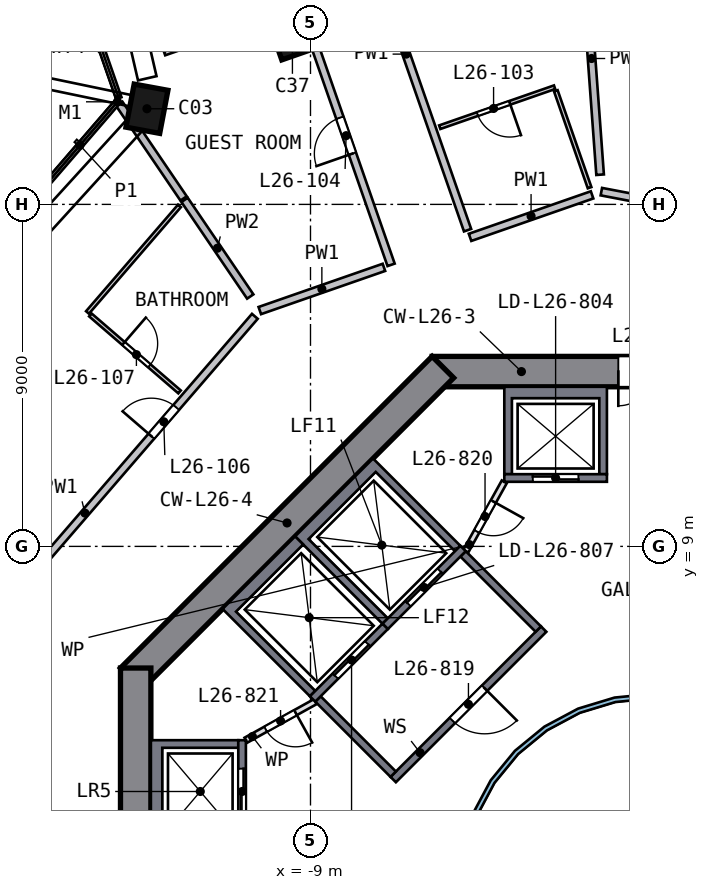
"""IFC4 building model, lengths in metres.
Left out: names, types, materials, properties, quantities, classifications, styles, units other than length and angle.
Written with IfcOpenShell. Run it as: python <this file> out.ifc"""

import sys

from ifc_helpers import new_model, si_unit, direction, frame, frame_2d, origin, origin_2d, place, context, subcontext, project, spatial, polyline, rectangle, outline, extrude, element, fill, save


model = new_model("IFC4")
c1 = context("Model", 3, precision=1e-05, world=origin(), true_north=direction((0.0, 1.0)))
c2 = subcontext(c1, "Body", "Model", "MODEL_VIEW")
j1 = project(units=[si_unit("LENGTHUNIT", "METRE"), si_unit("PLANEANGLEUNIT", "RADIAN")], contexts=[c1])
p1 = place(None, origin())
s1 = spatial("IfcSite", under=j1, at=p1, CompositionType="ELEMENT")
p2 = place(p1, origin())
s2 = spatial("IfcBuilding", under=s1, at=p2, CompositionType="ELEMENT")
p3 = place(p2, frame((0.0, 0.0, 111.5)))
s3 = spatial("IfcBuildingStorey", under=s2, at=p3, CompositionType="ELEMENT", Elevation=111.5)
p4 = place(p3, frame((-13.186, 20.594, 0.0), z_axis=(-0.097375682, -0.063548845, 0.993216754), x_axis=(0.179806408, 0.98041432, 0.080358058)))
e1 = element("IfcColumn", 1, at=p4, inside=s3, PredefinedType="COLUMN", context=c2, shape_type="SweptSolid", body=[
    extrude(rectangle(XDim=1.15, YDim=0.9, at=origin_2d()), origin(), (0.0, 0.0, 1.0), 3.212),
])
p5 = place(p3, frame((-9.347, 22.432, 0.0), z_axis=(-0.106278765, -0.045309116, 0.993303533), x_axis=(-0.329531478, 0.944112311, 0.007806975)))
e2 = element("IfcColumn", 2, at=p5, inside=s3, PredefinedType="COLUMN", context=c2, shape_type="SweptSolid", body=[
    extrude(rectangle(XDim=0.9, YDim=0.9, at=origin_2d()), origin(), (0.0, 0.0, 1.0), 3.211),
])
p6 = place(p3, frame((5.799, 13.6, 0.0), z_axis=(0.0, 0.0, 1.0), x_axis=(-1.0, 0.0, 0.0)))
e3 = element("IfcWall", 3, at=p6, inside=s3, PredefinedType="SHEAR", context=c2, shape_type="SweptSolid", body=[
    extrude(rectangle(XDim=11.598, YDim=0.8, at=frame_2d((5.799, 0.0))), origin(), (0.0, 0.0, 1.0), 3.5),
])
p7 = place(p6, frame((4.899, 0.0, 0.0)))
e4 = element("IfcOpeningElement", 4, at=p7, cuts=e3, PredefinedType="OPENING", context=c2, shape_type="SweptSolid", body=[
    extrude(rectangle(XDim=1.8, YDim=2.1, at=frame_2d((0.9, 1.05))), frame((0.0, 0.41, 0.0), z_axis=(0.0, -1.0, 0.0), x_axis=(1.0, 0.0, 0.0)), (0.0, 0.0, 1.0), 0.82),
])
p8 = place(p3, frame((-5.516, 13.717, 0.0), z_axis=(0.0, 0.0, 1.0), x_axis=(-0.707106781, -0.707106781, 0.0)))
e5 = element("IfcWall", 5, at=p8, inside=s3, PredefinedType="SHEAR", context=c2, shape_type="SweptSolid", body=[
    extrude(rectangle(XDim=11.598, YDim=0.8, at=frame_2d((5.799, 0.0))), origin(), (0.0, 0.0, 1.0), 3.5),
])
p9 = place(p3, frame((-13.6, 5.799, 0.0), z_axis=(0.0, 0.0, 1.0), x_axis=(0.0, -1.0, 0.0)))
e6 = element("IfcWall", 6, at=p9, inside=s3, PredefinedType="SHEAR", context=c2, shape_type="SweptSolid", body=[
    extrude(rectangle(XDim=11.598, YDim=0.8, at=frame_2d((5.799, 0.0))), origin(), (0.0, 0.0, 1.0), 3.5),
])
p10 = place(p9, frame((4.899, 0.0, 0.0)))
e7 = element("IfcOpeningElement", 7, at=p10, cuts=e6, PredefinedType="OPENING", context=c2, shape_type="SweptSolid", body=[
    extrude(rectangle(XDim=1.8, YDim=2.1, at=frame_2d((0.9, 1.05))), frame((0.0, 0.41, 0.0), z_axis=(0.0, -1.0, 0.0), x_axis=(1.0, 0.0, 0.0)), (0.0, 0.0, 1.0), 0.82),
])
p11 = place(p3, origin())
e8 = element("IfcWall", 8, at=p11, inside=s3, PredefinedType="SOLIDWALL", context=c2, shape_type="SweptSolid", body=[
    extrude(outline(polyline([(-3.9, 10.9), (-3.9, 13.2), (-1.2, 13.2), (-1.2, 10.9), (-1.4, 10.9), (-1.4, 12.9), (-3.7, 12.9), (-3.7, 10.9), (-3.9, 10.9)])), origin(), (0.0, 0.0, 1.0), 3.19),
])
p12 = place(p3, frame((-1.2, 10.8, 0.0), z_axis=(0.0, 0.0, 1.0), x_axis=(-1.0, 0.0, 0.0)))
e9 = element("IfcWall", 9, at=p12, inside=s3, PredefinedType="SOLIDWALL", context=c2, shape_type="SweptSolid", body=[
    extrude(rectangle(XDim=2.7, YDim=0.2, at=frame_2d((1.35, 0.0))), origin(), (0.0, 0.0, 1.0), 3.19),
])
p13 = place(p12, frame((0.75, 0.0, 0.0)))
e10 = element("IfcOpeningElement", 10, at=p13, cuts=e9, PredefinedType="OPENING", context=c2, shape_type="SweptSolid", body=[
    extrude(rectangle(XDim=1.2, YDim=2.1, at=frame_2d((0.6, 1.05))), frame((0.0, 0.11, 0.0), z_axis=(0.0, -1.0, 0.0), x_axis=(1.0, 0.0, 0.0)), (0.0, 0.0, 1.0), 0.22),
])
p14 = place(p3, origin())
e11 = element("IfcWall", 11, at=p14, inside=s3, PredefinedType="SOLIDWALL", context=c2, shape_type="SweptSolid", body=[
    extrude(outline(polyline([(-13.2, 3.9), (-10.9, 3.9), (-10.9, 3.7), (-12.9, 3.7), (-12.9, 1.4), (-10.9, 1.4), (-10.9, 1.2), (-13.2, 1.2), (-13.2, 3.9)])), origin(), (0.0, 0.0, 1.0), 3.19),
])
p15 = place(p3, frame((-10.8, 1.2, 0.0), z_axis=(0.0, 0.0, 1.0), x_axis=(0.0, 1.0, 0.0)))
e12 = element("IfcWall", 12, at=p15, inside=s3, PredefinedType="SOLIDWALL", context=c2, shape_type="SweptSolid", body=[
    extrude(rectangle(XDim=2.7, YDim=0.2, at=frame_2d((1.35, 0.0))), origin(), (0.0, 0.0, 1.0), 3.19),
])
p16 = place(p15, frame((0.75, 0.0, 0.0)))
e13 = element("IfcOpeningElement", 13, at=p16, cuts=e12, PredefinedType="OPENING", context=c2, shape_type="SweptSolid", body=[
    extrude(rectangle(XDim=1.2, YDim=2.1, at=frame_2d((0.6, 1.05))), frame((0.0, 0.11, 0.0), z_axis=(0.0, -1.0, 0.0), x_axis=(1.0, 0.0, 0.0)), (0.0, 0.0, 1.0), 0.22),
])
p17 = place(p3, origin())
e14 = element("IfcWall", 14, at=p17, inside=s3, PredefinedType="SOLIDWALL", context=c2, shape_type="SweptSolid", body=[
    extrude(outline(polyline([(-9.405, 9.263), (-7.354, 11.314), (-5.056, 9.016), (-5.197, 8.874), (-7.283, 10.96), (-9.051, 9.192), (-6.965, 7.106), (-7.106, 6.965), (-9.405, 9.263)])), origin(), (0.0, 0.0, 1.0), 3.19),
])
p18 = place(p3, frame((-4.985, 8.945, 0.0), z_axis=(0.0, 0.0, 1.0), x_axis=(-0.707106781, -0.707106781, 0.0)))
e15 = element("IfcWall", 15, at=p18, inside=s3, PredefinedType="SOLIDWALL", context=c2, shape_type="SweptSolid", body=[
    extrude(rectangle(XDim=2.9, YDim=0.2, at=frame_2d((1.45, 0.0))), origin(), (0.0, 0.0, 1.0), 3.19),
])
p19 = place(p18, frame((0.85, 0.0, 0.0)))
e16 = element("IfcOpeningElement", 16, at=p19, cuts=e15, PredefinedType="OPENING", context=c2, shape_type="SweptSolid", body=[
    extrude(rectangle(XDim=1.2, YDim=2.1, at=frame_2d((0.6, 1.05))), frame((0.0, 0.11, 0.0), z_axis=(0.0, -1.0, 0.0), x_axis=(1.0, 0.0, 0.0)), (0.0, 0.0, 1.0), 0.22),
])
p20 = place(p3, origin())
e17 = element("IfcWall", 17, at=p20, inside=s3, PredefinedType="SOLIDWALL", context=c2, shape_type="SweptSolid", body=[
    extrude(outline(polyline([(-11.314, 7.354), (-9.405, 9.263), (-9.192, 9.051), (-10.96, 7.283), (-8.874, 5.197), (-9.016, 5.056), (-11.314, 7.354)])), origin(), (0.0, 0.0, 1.0), 3.19),
])
p21 = place(p3, frame((-7.036, 6.894, 0.0), z_axis=(0.0, 0.0, 1.0), x_axis=(-0.707106781, -0.707106781, 0.0)))
e18 = element("IfcWall", 18, at=p21, inside=s3, PredefinedType="SOLIDWALL", context=c2, shape_type="SweptSolid", body=[
    extrude(rectangle(XDim=2.7, YDim=0.2, at=frame_2d((1.35, 0.0))), origin(), (0.0, 0.0, 1.0), 3.19),
])
p22 = place(p21, frame((0.65, 0.0, 0.0)))
e19 = element("IfcOpeningElement", 19, at=p22, cuts=e18, PredefinedType="OPENING", context=c2, shape_type="SweptSolid", body=[
    extrude(rectangle(XDim=1.2, YDim=2.1, at=frame_2d((0.6, 1.05))), frame((0.0, 0.11, 0.0), z_axis=(0.0, -1.0, 0.0), x_axis=(1.0, 0.0, 0.0)), (0.0, 0.0, 1.0), 0.22),
])
p23 = place(p3, frame((-2.864, 6.823, 0.0), z_axis=(0.0, 0.0, 1.0), x_axis=(-0.707106781, -0.707106781, 0.0)))
e20 = element("IfcWall", 20, at=p23, inside=s3, PredefinedType="SOLIDWALL", context=c2, shape_type="SweptSolid", body=[
    extrude(rectangle(XDim=5.6, YDim=0.2, at=frame_2d((2.8, 0.0))), origin(), (0.0, 0.0, 1.0), 3.19),
])
p24 = place(p23, frame((2.2, 0.0, 0.0)))
e21 = element("IfcOpeningElement", 21, at=p24, cuts=e20, PredefinedType="OPENING", context=c2, shape_type="SweptSolid", body=[
    extrude(rectangle(XDim=1.2, YDim=2.1, at=frame_2d((0.6, 1.05))), frame((0.0, 0.11, 0.0), z_axis=(0.0, -1.0, 0.0), x_axis=(1.0, 0.0, 0.0)), (0.0, 0.0, 1.0), 0.22),
])
for number, where, z_axis, x_axis in (
    (22, (-3.005, 6.823, 0.0), (0.0, 0.0, 1.0), (-0.707, 0.707, 0.0)),
    (23, (-6.823, 3.005, 0.0), (0.0, 0.0, 1.0), (-0.707, 0.707, 0.0)),
):
    element("IfcWall", number, at=place(p3, frame(where, z_axis=z_axis, x_axis=x_axis)), inside=s3, PredefinedType="SOLIDWALL", context=c2, shape_type="SweptSolid", body=[
        extrude(rectangle(XDim=2.8, YDim=0.2, at=frame_2d((1.4, 0.0))), origin(), (0.0, 0.0, 1.0), 3.19),
    ])
p25 = place(p3, frame((-3.9, 10.7, 0.0), z_axis=(0.0, 0.0, 1.0), x_axis=(-0.485692555, -0.874129705, 0.0)))
e24 = element("IfcWall", 24, at=p25, inside=s3, PredefinedType="PARTITIONING", context=c2, shape_type="SweptSolid", body=[
    extrude(rectangle(XDim=2.089, YDim=0.15, at=frame_2d((1.044, 0.0))), origin(), (0.0, 0.0, 1.0), 3.19),
])
p26 = place(p25, frame((0.594, 0.0, 0.0)))
e25 = element("IfcOpeningElement", 25, at=p26, cuts=e24, PredefinedType="OPENING", context=c2, shape_type="SweptSolid", body=[
    extrude(rectangle(XDim=0.9, YDim=2.1, at=frame_2d((0.45, 1.05))), frame((0.0, 0.085, 0.0), z_axis=(0.0, -1.0, 0.0), x_axis=(1.0, 0.0, 0.0)), (0.0, 0.0, 1.0), 0.17),
])
p27 = place(p3, frame((-8.874, 4.914, 0.0), z_axis=(0.0, 0.0, 1.0), x_axis=(-0.874129705, -0.485692555, 0.0)))
e26 = element("IfcWall", 26, at=p27, inside=s3, PredefinedType="PARTITIONING", context=c2, shape_type="SweptSolid", body=[
    extrude(rectangle(XDim=2.089, YDim=0.15, at=frame_2d((1.044, 0.0))), origin(), (0.0, 0.0, 1.0), 3.19),
])
p28 = place(p27, frame((0.594, 0.0, 0.0)))
e27 = element("IfcOpeningElement", 27, at=p28, cuts=e26, PredefinedType="OPENING", context=c2, shape_type="SweptSolid", body=[
    extrude(rectangle(XDim=0.9, YDim=2.1, at=frame_2d((0.45, 1.05))), frame((0.0, 0.085, 0.0), z_axis=(0.0, -1.0, 0.0), x_axis=(1.0, 0.0, 0.0)), (0.0, 0.0, 1.0), 0.17),
])
p29 = place(p3, origin())
e28 = element("IfcWall", 28, at=p29, inside=s3, PredefinedType="SOLIDWALL", context=c2, shape_type="SweptSolid", body=[
    extrude(outline(polyline([(5.021, -0.999), (4.73, -1.959), (4.257, -2.844), (3.62, -3.62), (2.844, -4.257), (1.959, -4.73), (0.999, -5.021), (0.0, -5.12), (-0.999, -5.021), (-1.959, -4.73), (-2.844, -4.257), (-3.62, -3.62), (-4.257, -2.844), (-4.73, -1.959), (-5.021, -0.999), (-5.12, 0.0), (-5.021, 0.999), (-4.73, 1.959), (-4.257, 2.844), (-3.62, 3.62), (-2.844, 4.257), (-1.959, 4.73), (-0.999, 5.021), (0.0, 5.12), (0.999, 5.021), (1.959, 4.73), (2.844, 4.257), (3.62, 3.62), (4.257, 2.844), (4.73, 1.959), (5.021, 0.999), (5.12, 0.0), (5.021, -0.999)]), holes=[polyline([(4.904, 0.976), (4.619, 1.913), (4.157, 2.778), (3.535, 3.535), (2.778, 4.157), (1.913, 4.619), (0.976, 4.904), (0.0, 5.0), (-0.976, 4.904), (-1.913, 4.619), (-2.778, 4.157), (-3.535, 3.535), (-4.157, 2.778), (-4.619, 1.913), (-4.904, 0.976), (-5.0, 0.0), (-4.904, -0.976), (-4.619, -1.913), (-4.157, -2.778), (-3.535, -3.535), (-2.778, -4.157), (-1.913, -4.619), (-0.976, -4.904), (0.0, -5.0), (0.976, -4.904), (1.913, -4.619), (2.778, -4.157), (3.535, -3.535), (4.157, -2.778), (4.619, -1.913), (4.904, -0.976), (5.0, 0.0), (4.904, 0.976)])]), origin(), (0.0, 0.0, 1.0), 3.19),
])
p30 = place(p3, frame((-16.552, 8.002, 0.0), z_axis=(0.0, 0.0, 1.0), x_axis=(0.653409696, 0.757004471, 0.0)))
e29 = element("IfcWall", 29, at=p30, inside=s3, PredefinedType="SOLIDWALL", context=c2, shape_type="SweptSolid", body=[
    extrude(rectangle(XDim=9.316, YDim=0.2, at=frame_2d((4.658, 0.0))), origin(), (0.0, 0.0, 1.0), 3.19),
])
p31 = place(p30, frame((5.15, 0.0, 0.0)))
e30 = element("IfcOpeningElement", 30, at=p31, cuts=e29, PredefinedType="OPENING", context=c2, shape_type="SweptSolid", body=[
    extrude(rectangle(XDim=1.0, YDim=2.1, at=frame_2d((0.5, 1.05))), frame((0.0, 0.11, 0.0), z_axis=(0.0, -1.0, 0.0), x_axis=(1.0, 0.0, 0.0)), (0.0, 0.0, 1.0), 0.22),
])
p32 = place(p3, frame((-7.068, 16.343, 0.0), z_axis=(0.0, 0.0, 1.0), x_axis=(-0.944384357, -0.328843712, 0.0)))
e31 = element("IfcWall", 31, at=p32, inside=s3, PredefinedType="SOLIDWALL", context=c2, shape_type="SweptSolid", body=[
    extrude(rectangle(XDim=3.458, YDim=0.2, at=frame_2d((1.729, 0.0))), origin(), (0.0, 0.0, 1.0), 3.19),
])
p33 = place(p3, frame((-6.879, 16.409, 0.0), z_axis=(0.0, 0.0, 1.0), x_axis=(-0.328868616, 0.944375684, 0.0)))
e32 = element("IfcWall", 32, at=p33, inside=s3, PredefinedType="SOLIDWALL", context=c2, shape_type="SweptSolid", body=[
    extrude(rectangle(XDim=10.013, YDim=0.2, at=frame_2d((5.006, 0.0))), origin(), (0.0, 0.0, 1.0), 3.19),
])
p34 = place(p33, frame((3.1, 0.0, 0.0)))
e33 = element("IfcOpeningElement", 33, at=p34, cuts=e32, PredefinedType="OPENING", context=c2, shape_type="SweptSolid", body=[
    extrude(rectangle(XDim=1.0, YDim=2.1, at=frame_2d((0.5, 1.05))), frame((0.0, 0.11, 0.0), z_axis=(0.0, -1.0, 0.0), x_axis=(1.0, 0.0, 0.0)), (0.0, 0.0, 1.0), 0.22),
])
p35 = place(p3, frame((-4.867, 17.321, 0.0), z_axis=(0.0, 0.0, 1.0), x_axis=(-0.328858345, 0.944379261, 0.0)))
e34 = element("IfcWall", 34, at=p35, inside=s3, PredefinedType="SOLIDWALL", context=c2, shape_type="SweptSolid", body=[
    extrude(rectangle(XDim=9.813, YDim=0.2, at=frame_2d((4.906, 0.0))), origin(), (0.0, 0.0, 1.0), 3.19),
])
p36 = place(p3, frame((-1.59, 18.25, 0.0), z_axis=(0.0, 0.0, 1.0), x_axis=(-0.944376615, -0.328865944, 0.0)))
e35 = element("IfcWall", 35, at=p36, inside=s3, PredefinedType="SOLIDWALL", context=c2, shape_type="SweptSolid", body=[
    extrude(rectangle(XDim=3.4, YDim=0.2, at=frame_2d((1.7, 0.0))), origin(), (0.0, 0.0, 1.0), 3.19),
])
p37 = place(p3, frame((8.001, 16.552, 0.0), z_axis=(0.0, 0.0, 1.0), x_axis=(-0.982286432, 0.187385606, 0.0)))
e36 = element("IfcWall", 36, at=p37, inside=s3, PredefinedType="SOLIDWALL", context=c2, shape_type="SweptSolid", body=[
    extrude(rectangle(XDim=9.516, YDim=0.2, at=frame_2d((4.758, 0.0))), origin(), (0.0, 0.0, 1.0), 3.19),
])
p38 = place(p3, frame((-12.339, 18.156, 0.0), z_axis=(0.0, 0.0, 1.0), x_axis=(-0.562123746, 0.827053138, 0.0)))
e37 = element("IfcWall", 37, at=p38, inside=s3, PredefinedType="SOLIDWALL", context=c2, shape_type="SweptSolid", body=[
    extrude(rectangle(XDim=3.011, YDim=0.2, at=frame_2d((1.506, 0.0))), origin(), (0.0, 0.0, 1.0), 3.19),
])
p39 = place(p3, frame((-10.585, 15.576, 0.0), z_axis=(0.0, 0.0, 1.0), x_axis=(-0.562099331, 0.827069732, 0.0)))
e38 = element("IfcWall", 38, at=p39, inside=s3, PredefinedType="SOLIDWALL", context=c2, shape_type="SweptSolid", body=[
    extrude(rectangle(XDim=3.075, YDim=0.2, at=frame_2d((1.537, 0.0))), origin(), (0.0, 0.0, 1.0), 3.19),
])
p40 = place(p3, frame((-1.828, 24.897, 0.0), z_axis=(0.0, 0.0, 1.0), x_axis=(0.073258648, -0.997312975, 0.0)))
e39 = element("IfcWall", 39, at=p40, inside=s3, PredefinedType="SOLIDWALL", context=c2, shape_type="SweptSolid", body=[
    extrude(rectangle(XDim=6.132, YDim=0.2, at=frame_2d((3.066, 0.0))), origin(), (0.0, 0.0, 1.0), 3.19),
])
p41 = place(p3, frame((-14.868, 15.156, 0.0), z_axis=(0.0, 0.0, 1.0), x_axis=(0.653436238, 0.756981561, 0.0)))
e40 = element("IfcWall", 40, at=p41, inside=s3, PredefinedType="PARTITIONING", context=c2, shape_type="SweptSolid", body=[
    extrude(rectangle(XDim=3.704, YDim=0.1, at=frame_2d((1.852, 0.0))), origin(), (0.0, 0.0, 1.0), 3.19),
])
p42 = place(p3, frame((-14.792, 15.091, 0.0), z_axis=(0.0, 0.0, 1.0), x_axis=(0.75698944, -0.65342711, 0.0)))
e41 = element("IfcWall", 41, at=p42, inside=s3, PredefinedType="PARTITIONING", context=c2, shape_type="SweptSolid", body=[
    extrude(rectangle(XDim=3.1, YDim=0.1, at=frame_2d((1.55, 0.0))), origin(), (0.0, 0.0, 1.0), 3.19),
])
p43 = place(p42, frame((1.15, 0.0, 0.0)))
e42 = element("IfcOpeningElement", 42, at=p43, cuts=e41, PredefinedType="OPENING", context=c2, shape_type="SweptSolid", body=[
    extrude(rectangle(XDim=0.9, YDim=2.1, at=frame_2d((0.45, 1.05))), frame((0.0, 0.06, 0.0), z_axis=(0.0, -1.0, 0.0), x_axis=(1.0, 0.0, 0.0)), (0.0, 0.0, 1.0), 0.12),
])
p44 = place(p3, frame((-12.84, 21.971, 0.0), z_axis=(0.0, 0.0, 1.0), x_axis=(0.944359478, 0.32891515, 0.0)))
e43 = element("IfcWall", 43, at=p44, inside=s3, PredefinedType="PARTITIONING", context=c2, shape_type="SweptSolid", body=[
    extrude(rectangle(XDim=3.6, YDim=0.1, at=frame_2d((1.8, 0.0))), origin(), (0.0, 0.0, 1.0), 3.19),
])
p45 = place(p44, frame((1.4, 0.0, 0.0)))
e44 = element("IfcOpeningElement", 44, at=p45, cuts=e43, PredefinedType="OPENING", context=c2, shape_type="SweptSolid", body=[
    extrude(rectangle(XDim=1.0, YDim=2.1, at=frame_2d((0.5, 1.05))), frame((0.0, 0.06, 0.0), z_axis=(0.0, -1.0, 0.0), x_axis=(1.0, 0.0, 0.0)), (0.0, 0.0, 1.0), 0.12),
])
p46 = place(p3, frame((-2.577, 21.083, 0.0), z_axis=(0.0, 0.0, 1.0), x_axis=(-0.94439589, -0.328810589, 0.0)))
e45 = element("IfcWall", 45, at=p46, inside=s3, PredefinedType="PARTITIONING", context=c2, shape_type="SweptSolid", body=[
    extrude(rectangle(XDim=3.2, YDim=0.1, at=frame_2d((1.6, 0.0))), origin(), (0.0, 0.0, 1.0), 3.19),
])
p47 = place(p46, frame((1.25, 0.0, 0.0)))
e46 = element("IfcOpeningElement", 46, at=p47, cuts=e45, PredefinedType="OPENING", context=c2, shape_type="SweptSolid", body=[
    extrude(rectangle(XDim=0.9, YDim=2.1, at=frame_2d((0.45, 1.05))), frame((0.0, 0.06, 0.0), z_axis=(0.0, -1.0, 0.0), x_axis=(1.0, 0.0, 0.0)), (0.0, 0.0, 1.0), 0.12),
])
p48 = place(p3, frame((-1.656, 18.439, 0.0), z_axis=(0.0, 0.0, 1.0), x_axis=(-0.328867808, 0.944375966, 0.0)))
e47 = element("IfcWall", 47, at=p48, inside=s3, PredefinedType="PARTITIONING", context=c2, shape_type="SweptSolid", body=[
    extrude(rectangle(XDim=2.7, YDim=0.1, at=frame_2d((1.35, 0.0))), origin(), (0.0, 0.0, 1.0), 3.19),
])
p49 = place(p13, origin())
e48 = element("IfcDoor", 48, at=p49, inside=s3, OperationType="DOUBLE_DOOR_SLIDING", PredefinedType="DOOR", context=c2, shape_type="SweptSolid", body=[
    extrude(rectangle(XDim=1.2, YDim=2.1, at=frame_2d((0.6, 1.05))), frame((0.0, 0.025, 0.0), z_axis=(0.0, -1.0, 0.0), x_axis=(1.0, 0.0, 0.0)), (0.0, 0.0, 1.0), 0.05),
])
fill(e10, e48)
p50 = place(p16, origin())
e49 = element("IfcDoor", 49, at=p50, inside=s3, OperationType="DOUBLE_DOOR_SLIDING", PredefinedType="DOOR", context=c2, shape_type="SweptSolid", body=[
    extrude(rectangle(XDim=1.2, YDim=2.1, at=frame_2d((0.6, 1.05))), frame((0.0, 0.025, 0.0), z_axis=(0.0, -1.0, 0.0), x_axis=(1.0, 0.0, 0.0)), (0.0, 0.0, 1.0), 0.05),
])
fill(e13, e49)
p51 = place(p19, origin())
e50 = element("IfcDoor", 50, at=p51, inside=s3, OperationType="DOUBLE_DOOR_SLIDING", PredefinedType="DOOR", context=c2, shape_type="SweptSolid", body=[
    extrude(rectangle(XDim=1.2, YDim=2.1, at=frame_2d((0.6, 1.05))), frame((0.0, 0.025, 0.0), z_axis=(0.0, -1.0, 0.0), x_axis=(1.0, 0.0, 0.0)), (0.0, 0.0, 1.0), 0.05),
])
fill(e16, e50)
p52 = place(p22, origin())
e51 = element("IfcDoor", 51, at=p52, inside=s3, OperationType="DOUBLE_DOOR_SLIDING", PredefinedType="DOOR", context=c2, shape_type="SweptSolid", body=[
    extrude(rectangle(XDim=1.2, YDim=2.1, at=frame_2d((0.6, 1.05))), frame((0.0, 0.025, 0.0), z_axis=(0.0, -1.0, 0.0), x_axis=(1.0, 0.0, 0.0)), (0.0, 0.0, 1.0), 0.05),
])
fill(e19, e51)
p53 = place(p7, origin())
e52 = element("IfcDoor", 52, at=p53, inside=s3, OperationType="DOUBLE_DOOR_SINGLE_SWING", PredefinedType="DOOR", context=c2, shape_type="SweptSolid", body=[
    extrude(rectangle(XDim=1.8, YDim=2.1, at=frame_2d((0.9, 1.05))), frame((0.0, 0.025, 0.0), z_axis=(0.0, -1.0, 0.0), x_axis=(1.0, 0.0, 0.0)), (0.0, 0.0, 1.0), 0.05),
])
fill(e4, e52)
p54 = place(p24, origin())
e53 = element("IfcDoor", 53, at=p54, inside=s3, OperationType="SINGLE_SWING_LEFT", PredefinedType="DOOR", context=c2, shape_type="SweptSolid", body=[
    extrude(rectangle(XDim=1.2, YDim=2.1, at=frame_2d((0.6, 1.05))), frame((0.0, 0.025, 0.0), z_axis=(0.0, -1.0, 0.0), x_axis=(1.0, 0.0, 0.0)), (0.0, 0.0, 1.0), 0.05),
])
fill(e21, e53)
p55 = place(p26, origin())
e54 = element("IfcDoor", 54, at=p55, inside=s3, OperationType="SINGLE_SWING_LEFT", PredefinedType="DOOR", context=c2, shape_type="SweptSolid", body=[
    extrude(rectangle(XDim=0.9, YDim=2.1, at=frame_2d((0.45, 1.05))), frame((0.0, 0.025, 0.0), z_axis=(0.0, -1.0, 0.0), x_axis=(1.0, 0.0, 0.0)), (0.0, 0.0, 1.0), 0.05),
])
fill(e25, e54)
p56 = place(p28, origin())
e55 = element("IfcDoor", 55, at=p56, inside=s3, OperationType="SINGLE_SWING_LEFT", PredefinedType="DOOR", context=c2, shape_type="SweptSolid", body=[
    extrude(rectangle(XDim=0.9, YDim=2.1, at=frame_2d((0.45, 1.05))), frame((0.0, 0.025, 0.0), z_axis=(0.0, -1.0, 0.0), x_axis=(1.0, 0.0, 0.0)), (0.0, 0.0, 1.0), 0.05),
])
fill(e27, e55)
p57 = place(p47, origin())
e56 = element("IfcDoor", 56, at=p57, inside=s3, OperationType="SINGLE_SWING_LEFT", PredefinedType="DOOR", context=c2, shape_type="SweptSolid", body=[
    extrude(rectangle(XDim=0.9, YDim=2.1, at=frame_2d((0.45, 1.05))), frame((0.0, 0.025, 0.0), z_axis=(0.0, -1.0, 0.0), x_axis=(1.0, 0.0, 0.0)), (0.0, 0.0, 1.0), 0.05),
])
fill(e46, e56)
p58 = place(p34, origin())
e57 = element("IfcDoor", 57, at=p58, inside=s3, OperationType="SINGLE_SWING_LEFT", PredefinedType="DOOR", context=c2, shape_type="SweptSolid", body=[
    extrude(rectangle(XDim=1.0, YDim=2.1, at=frame_2d((0.5, 1.05))), frame((0.0, 0.025, 0.0), z_axis=(0.0, -1.0, 0.0), x_axis=(1.0, 0.0, 0.0)), (0.0, 0.0, 1.0), 0.05),
])
fill(e33, e57)
p59 = place(p31, origin())
e58 = element("IfcDoor", 58, at=p59, inside=s3, OperationType="SINGLE_SWING_LEFT", PredefinedType="DOOR", context=c2, shape_type="SweptSolid", body=[
    extrude(rectangle(XDim=1.0, YDim=2.1, at=frame_2d((0.5, 1.05))), frame((0.0, 0.025, 0.0), z_axis=(0.0, -1.0, 0.0), x_axis=(1.0, 0.0, 0.0)), (0.0, 0.0, 1.0), 0.05),
])
fill(e30, e58)
p60 = place(p43, origin())
e59 = element("IfcDoor", 59, at=p60, inside=s3, OperationType="SINGLE_SWING_LEFT", PredefinedType="DOOR", context=c2, shape_type="SweptSolid", body=[
    extrude(rectangle(XDim=0.9, YDim=2.1, at=frame_2d((0.45, 1.05))), frame((0.0, 0.025, 0.0), z_axis=(0.0, -1.0, 0.0), x_axis=(1.0, 0.0, 0.0)), (0.0, 0.0, 1.0), 0.05),
])
fill(e42, e59)
save(model, sys.argv[1])
